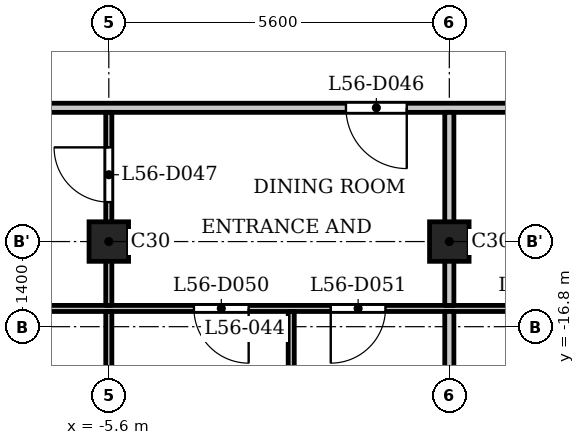
"""IFC4 building model, lengths in metres.
Left out: names, types, materials, properties, quantities, classifications, styles, units other than length and angle.
Written with IfcOpenShell. Run it as: python <this file> out.ifc"""

import sys

from ifc_helpers import new_model, si_unit, direction, frame, frame_2d, origin, origin_2d, place, context, subcontext, project, spatial, rectangle, extrude, element, fill, save


model = new_model("IFC4")
c1 = context("Model", 3, precision=1e-05, world=origin(), true_north=direction((0.0, 1.0)))
c2 = subcontext(c1, "Body", "Model", "MODEL_VIEW")
j1 = project(units=[si_unit("LENGTHUNIT", "METRE"), si_unit("PLANEANGLEUNIT", "RADIAN")], contexts=[c1])
p1 = place(None, origin())
s1 = spatial("IfcSite", under=j1, at=p1, CompositionType="ELEMENT")
p2 = place(p1, origin())
s2 = spatial("IfcBuilding", under=s1, at=p2, CompositionType="ELEMENT")
p3 = place(p2, frame((0.0, 0.0, 216.9)))
s3 = spatial("IfcBuildingStorey", under=s2, at=p3, CompositionType="ELEMENT", Elevation=216.9)
for number, where, z_axis, x_axis in (
    (1, (-5.6, -15.4, 0.0), (0.0, 0.0, 1.0), (1.0, 0.0, 0.0)),
    (2, (0.0, -15.4, 0.0), (0.0, 0.0, 1.0), (1.0, 0.0, 0.0)),
):
    element("IfcColumn", number, at=place(p3, frame(where, z_axis=z_axis, x_axis=x_axis)), inside=s3, PredefinedType="COLUMN", context=c2, shape_type="SweptSolid", body=[
        extrude(rectangle(XDim=0.65, YDim=0.65, at=origin_2d()), origin(), (0.0, 0.0, 1.0), 3.5),
    ])
p4 = place(p3, frame((-16.725, -16.5, 0.0), z_axis=(0.0, 0.0, 1.0), x_axis=(1.0, 0.0, 0.0)))
e3 = element("IfcWall", 3, at=p4, inside=s3, PredefinedType="PARTITIONING", context=c2, shape_type="SweptSolid", body=[
    extrude(rectangle(XDim=33.45, YDim=0.1, at=frame_2d((16.725, 0.0))), origin(), (0.0, 0.0, 1.0), 3.2),
])
p5 = place(p4, frame((0.675, 0.0, 0.0)))
e4 = element("IfcOpeningElement", 4, at=p5, cuts=e3, PredefinedType="OPENING", context=c2, shape_type="SweptSolid", body=[
    extrude(rectangle(XDim=0.8, YDim=2.1, at=frame_2d((0.4, 1.05))), frame((0.0, 0.06, 0.0), z_axis=(0.0, -1.0, 0.0), x_axis=(1.0, 0.0, 0.0)), (0.0, 0.0, 1.0), 0.12),
])
p6 = place(p4, frame((2.775, 0.0, 0.0)))
e5 = element("IfcOpeningElement", 5, at=p6, cuts=e3, PredefinedType="OPENING", context=c2, shape_type="SweptSolid", body=[
    extrude(rectangle(XDim=0.9, YDim=2.1, at=frame_2d((0.45, 1.05))), frame((0.0, 0.06, 0.0), z_axis=(0.0, -1.0, 0.0), x_axis=(1.0, 0.0, 0.0)), (0.0, 0.0, 1.0), 0.12),
])
p7 = place(p4, frame((6.425, 0.0, 0.0)))
e6 = element("IfcOpeningElement", 6, at=p7, cuts=e3, PredefinedType="OPENING", context=c2, shape_type="SweptSolid", body=[
    extrude(rectangle(XDim=0.8, YDim=2.1, at=frame_2d((0.4, 1.05))), frame((0.0, 0.06, 0.0), z_axis=(0.0, -1.0, 0.0), x_axis=(1.0, 0.0, 0.0)), (0.0, 0.0, 1.0), 0.12),
])
p8 = place(p4, frame((8.775, 0.0, 0.0)))
e7 = element("IfcOpeningElement", 7, at=p8, cuts=e3, PredefinedType="OPENING", context=c2, shape_type="SweptSolid", body=[
    extrude(rectangle(XDim=0.9, YDim=2.1, at=frame_2d((0.45, 1.05))), frame((0.0, 0.06, 0.0), z_axis=(0.0, -1.0, 0.0), x_axis=(1.0, 0.0, 0.0)), (0.0, 0.0, 1.0), 0.12),
])
p9 = place(p4, frame((12.525, 0.0, 0.0)))
e8 = element("IfcOpeningElement", 8, at=p9, cuts=e3, PredefinedType="OPENING", context=c2, shape_type="SweptSolid", body=[
    extrude(rectangle(XDim=0.9, YDim=2.1, at=frame_2d((0.45, 1.05))), frame((0.0, 0.06, 0.0), z_axis=(0.0, -1.0, 0.0), x_axis=(1.0, 0.0, 0.0)), (0.0, 0.0, 1.0), 0.12),
])
p10 = place(p4, frame((14.775, 0.0, 0.0)))
e9 = element("IfcOpeningElement", 9, at=p10, cuts=e3, PredefinedType="OPENING", context=c2, shape_type="SweptSolid", body=[
    extrude(rectangle(XDim=0.9, YDim=2.1, at=frame_2d((0.45, 1.05))), frame((0.0, 0.06, 0.0), z_axis=(0.0, -1.0, 0.0), x_axis=(1.0, 0.0, 0.0)), (0.0, 0.0, 1.0), 0.12),
])
p11 = place(p4, frame((25.475, 0.0, 0.0)))
e10 = element("IfcOpeningElement", 10, at=p11, cuts=e3, PredefinedType="OPENING", context=c2, shape_type="SweptSolid", body=[
    extrude(rectangle(XDim=0.8, YDim=2.1, at=frame_2d((0.4, 1.05))), frame((0.0, 0.06, 0.0), z_axis=(0.0, -1.0, 0.0), x_axis=(1.0, 0.0, 0.0)), (0.0, 0.0, 1.0), 0.12),
])
p12 = place(p4, frame((23.225, 0.0, 0.0)))
e11 = element("IfcOpeningElement", 11, at=p12, cuts=e3, PredefinedType="OPENING", context=c2, shape_type="SweptSolid", body=[
    extrude(rectangle(XDim=0.9, YDim=2.1, at=frame_2d((0.45, 1.05))), frame((0.0, 0.06, 0.0), z_axis=(0.0, -1.0, 0.0), x_axis=(1.0, 0.0, 0.0)), (0.0, 0.0, 1.0), 0.12),
])
p13 = place(p4, frame((17.875, 0.0, 0.0)))
e12 = element("IfcOpeningElement", 12, at=p13, cuts=e3, PredefinedType="OPENING", context=c2, shape_type="SweptSolid", body=[
    extrude(rectangle(XDim=0.9, YDim=2.1, at=frame_2d((0.45, 1.05))), frame((0.0, 0.06, 0.0), z_axis=(0.0, -1.0, 0.0), x_axis=(1.0, 0.0, 0.0)), (0.0, 0.0, 1.0), 0.12),
])
p14 = place(p4, frame((19.975, 0.0, 0.0)))
e13 = element("IfcOpeningElement", 13, at=p14, cuts=e3, PredefinedType="OPENING", context=c2, shape_type="SweptSolid", body=[
    extrude(rectangle(XDim=0.9, YDim=2.1, at=frame_2d((0.45, 1.05))), frame((0.0, 0.06, 0.0), z_axis=(0.0, -1.0, 0.0), x_axis=(1.0, 0.0, 0.0)), (0.0, 0.0, 1.0), 0.12),
])
p15 = place(p4, frame((30.825, 0.0, 0.0)))
e14 = element("IfcOpeningElement", 14, at=p15, cuts=e3, PredefinedType="OPENING", context=c2, shape_type="SweptSolid", body=[
    extrude(rectangle(XDim=0.8, YDim=2.1, at=frame_2d((0.4, 1.05))), frame((0.0, 0.06, 0.0), z_axis=(0.0, -1.0, 0.0), x_axis=(1.0, 0.0, 0.0)), (0.0, 0.0, 1.0), 0.12),
])
p16 = place(p4, frame((29.075, 0.0, 0.0)))
e15 = element("IfcOpeningElement", 15, at=p16, cuts=e3, PredefinedType="OPENING", context=c2, shape_type="SweptSolid", body=[
    extrude(rectangle(XDim=0.9, YDim=2.1, at=frame_2d((0.45, 1.05))), frame((0.0, 0.06, 0.0), z_axis=(0.0, -1.0, 0.0), x_axis=(1.0, 0.0, 0.0)), (0.0, 0.0, 1.0), 0.12),
])
p17 = place(p3, frame((-17.4, -13.2, 0.0), z_axis=(0.0, 0.0, 1.0), x_axis=(1.0, 0.0, 0.0)))
e16 = element("IfcWall", 16, at=p17, inside=s3, PredefinedType="PARTITIONING", context=c2, shape_type="SweptSolid", body=[
    extrude(rectangle(XDim=34.8, YDim=0.15, at=frame_2d((17.4, 0.0))), origin(), (0.0, 0.0, 1.0), 3.2),
])
p18 = place(p17, frame((0.15, 0.0, 0.0)))
e17 = element("IfcOpeningElement", 17, at=p18, cuts=e16, PredefinedType="OPENING", context=c2, shape_type="SweptSolid", body=[
    extrude(rectangle(XDim=1.0, YDim=2.1, at=frame_2d((0.5, 1.05))), frame((0.0, 0.085, 0.0), z_axis=(0.0, -1.0, 0.0), x_axis=(1.0, 0.0, 0.0)), (0.0, 0.0, 1.0), 0.17),
])
p19 = place(p17, frame((33.55, 0.0, 0.0)))
e18 = element("IfcOpeningElement", 18, at=p19, cuts=e16, PredefinedType="OPENING", context=c2, shape_type="SweptSolid", body=[
    extrude(rectangle(XDim=1.0, YDim=2.1, at=frame_2d((0.5, 1.05))), frame((0.0, 0.085, 0.0), z_axis=(0.0, -1.0, 0.0), x_axis=(1.0, 0.0, 0.0)), (0.0, 0.0, 1.0), 0.17),
])
p20 = place(p17, frame((3.7, 0.0, 0.0)))
e19 = element("IfcOpeningElement", 19, at=p20, cuts=e16, PredefinedType="OPENING", context=c2, shape_type="SweptSolid", body=[
    extrude(rectangle(XDim=1.0, YDim=2.1, at=frame_2d((0.5, 1.05))), frame((0.0, 0.085, 0.0), z_axis=(0.0, -1.0, 0.0), x_axis=(1.0, 0.0, 0.0)), (0.0, 0.0, 1.0), 0.17),
])
p21 = place(p17, frame((15.7, 0.0, 0.0)))
e20 = element("IfcOpeningElement", 20, at=p21, cuts=e16, PredefinedType="OPENING", context=c2, shape_type="SweptSolid", body=[
    extrude(rectangle(XDim=1.0, YDim=2.1, at=frame_2d((0.5, 1.05))), frame((0.0, 0.085, 0.0), z_axis=(0.0, -1.0, 0.0), x_axis=(1.0, 0.0, 0.0)), (0.0, 0.0, 1.0), 0.17),
])
p22 = place(p17, frame((21.3, 0.0, 0.0)))
e21 = element("IfcOpeningElement", 21, at=p22, cuts=e16, PredefinedType="OPENING", context=c2, shape_type="SweptSolid", body=[
    extrude(rectangle(XDim=1.0, YDim=2.1, at=frame_2d((0.5, 1.05))), frame((0.0, 0.085, 0.0), z_axis=(0.0, -1.0, 0.0), x_axis=(1.0, 0.0, 0.0)), (0.0, 0.0, 1.0), 0.17),
])
p23 = place(p17, frame((29.5, 0.0, 0.0)))
e22 = element("IfcOpeningElement", 22, at=p23, cuts=e16, PredefinedType="OPENING", context=c2, shape_type="SweptSolid", body=[
    extrude(rectangle(XDim=1.0, YDim=2.1, at=frame_2d((0.5, 1.05))), frame((0.0, 0.085, 0.0), z_axis=(0.0, -1.0, 0.0), x_axis=(1.0, 0.0, 0.0)), (0.0, 0.0, 1.0), 0.17),
])
p24 = place(p3, frame((-5.6, -22.08, 0.0), z_axis=(0.0, 0.0, 1.0), x_axis=(0.0, 1.0, 0.0)))
e23 = element("IfcWall", 23, at=p24, inside=s3, PredefinedType="PARTITIONING", context=c2, shape_type="SweptSolid", body=[
    extrude(rectangle(XDim=5.53, YDim=0.1, at=frame_2d((2.765, 0.0))), origin(), (0.0, 0.0, 1.0), 3.2),
])
p25 = place(p3, frame((-5.6, -16.45, 0.0), z_axis=(0.0, 0.0, 1.0), x_axis=(0.0, 1.0, 0.0)))
e24 = element("IfcWall", 24, at=p25, inside=s3, PredefinedType="PARTITIONING", context=c2, shape_type="SweptSolid", body=[
    extrude(rectangle(XDim=3.175, YDim=0.1, at=frame_2d((1.587, 0.0))), origin(), (0.0, 0.0, 1.0), 3.2),
])
p26 = place(p25, frame((1.699, 0.0, 0.0)))
e25 = element("IfcOpeningElement", 25, at=p26, cuts=e24, PredefinedType="OPENING", context=c2, shape_type="SweptSolid", body=[
    extrude(rectangle(XDim=0.9, YDim=2.1, at=frame_2d((0.45, 1.05))), frame((0.0, 0.06, 0.0), z_axis=(0.0, -1.0, 0.0), x_axis=(1.0, 0.0, 0.0)), (0.0, 0.0, 1.0), 0.12),
])
p27 = place(p3, frame((-2.6, -22.805, 0.0), z_axis=(0.0, 0.0, 1.0), x_axis=(0.0, 1.0, 0.0)))
e26 = element("IfcWall", 26, at=p27, inside=s3, PredefinedType="PARTITIONING", context=c2, shape_type="SweptSolid", body=[
    extrude(rectangle(XDim=6.255, YDim=0.1, at=frame_2d((3.127, 0.0))), origin(), (0.0, 0.0, 1.0), 3.2),
])
p28 = place(p3, frame((0.0, -22.08, 0.0), z_axis=(0.0, 0.0, 1.0), x_axis=(0.0, 1.0, 0.0)))
e27 = element("IfcWall", 27, at=p28, inside=s3, PredefinedType="PARTITIONING", context=c2, shape_type="SweptSolid", body=[
    extrude(rectangle(XDim=5.53, YDim=0.15, at=frame_2d((2.765, 0.0))), origin(), (0.0, 0.0, 1.0), 3.2),
])
p29 = place(p3, frame((0.0, -16.45, 0.0), z_axis=(0.0, 0.0, 1.0), x_axis=(0.0, 1.0, 0.0)))
e28 = element("IfcWall", 28, at=p29, inside=s3, PredefinedType="PARTITIONING", context=c2, shape_type="SweptSolid", body=[
    extrude(rectangle(XDim=3.175, YDim=0.15, at=frame_2d((1.587, 0.0))), origin(), (0.0, 0.0, 1.0), 3.2),
])
p30 = place(p21, origin())
e29 = element("IfcDoor", 29, at=p30, inside=s3, OperationType="SINGLE_SWING_RIGHT", PredefinedType="DOOR", context=c2, shape_type="SweptSolid", body=[
    extrude(rectangle(XDim=1.0, YDim=2.1, at=frame_2d((0.5, 1.05))), frame((0.0, 0.025, 0.0), z_axis=(0.0, -1.0, 0.0), x_axis=(1.0, 0.0, 0.0)), (0.0, 0.0, 1.0), 0.05),
])
fill(e20, e29)
p31 = place(p26, origin())
e30 = element("IfcDoor", 30, at=p31, inside=s3, OperationType="SINGLE_SWING_LEFT", PredefinedType="DOOR", context=c2, shape_type="SweptSolid", body=[
    extrude(rectangle(XDim=0.9, YDim=2.1, at=frame_2d((0.45, 1.05))), frame((0.0, 0.025, 0.0), z_axis=(0.0, -1.0, 0.0), x_axis=(1.0, 0.0, 0.0)), (0.0, 0.0, 1.0), 0.05),
])
fill(e25, e30)
p32 = place(p9, origin())
e31 = element("IfcDoor", 31, at=p32, inside=s3, OperationType="SINGLE_SWING_RIGHT", PredefinedType="DOOR", context=c2, shape_type="SweptSolid", body=[
    extrude(rectangle(XDim=0.9, YDim=2.1, at=frame_2d((0.45, 1.05))), frame((0.0, 0.025, 0.0), z_axis=(0.0, -1.0, 0.0), x_axis=(1.0, 0.0, 0.0)), (0.0, 0.0, 1.0), 0.05),
])
fill(e8, e31)
p33 = place(p10, origin())
e32 = element("IfcDoor", 32, at=p33, inside=s3, OperationType="SINGLE_SWING_LEFT", PredefinedType="DOOR", context=c2, shape_type="SweptSolid", body=[
    extrude(rectangle(XDim=0.9, YDim=2.1, at=frame_2d((0.45, 1.05))), frame((0.0, 0.025, 0.0), z_axis=(0.0, -1.0, 0.0), x_axis=(1.0, 0.0, 0.0)), (0.0, 0.0, 1.0), 0.05),
])
fill(e9, e32)
save(model, sys.argv[1])
